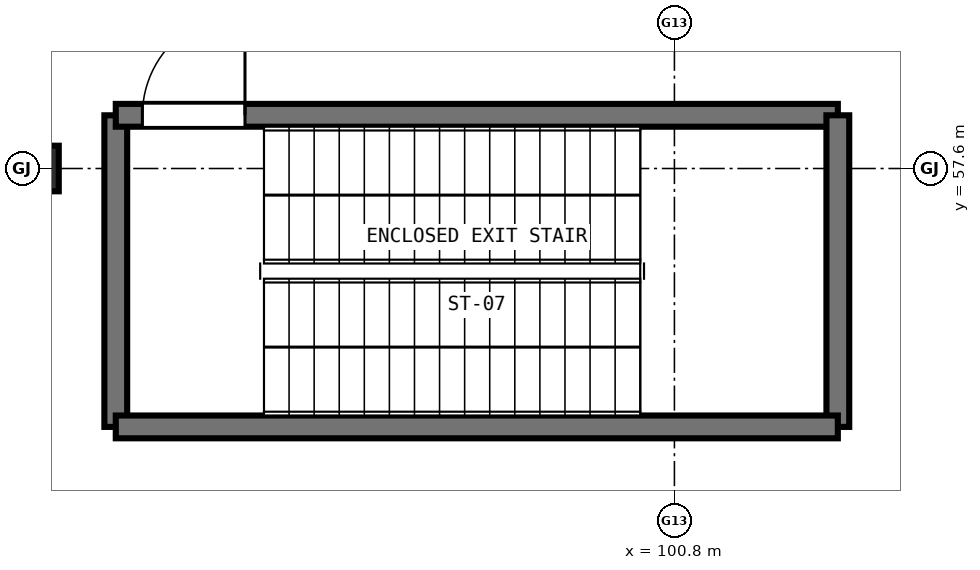
"""IFC4 building model, lengths in metres.
Left out: names, types, materials, properties, quantities, classifications, styles, units other than length and angle.
Written with IfcOpenShell. Run it as: python <this file> out.ifc"""

import sys

from ifc_helpers import new_model, si_unit, direction, frame, frame_2d, origin, origin_2d, place, context, subcontext, project, spatial, rectangle, extrude, element, fill, save


model = new_model("IFC4")
c1 = context("Model", 3, precision=1e-05, world=origin(), true_north=direction((0.0, 1.0)))
c2 = subcontext(c1, "Body", "Model", "MODEL_VIEW")
j1 = project(units=[si_unit("LENGTHUNIT", "METRE"), si_unit("PLANEANGLEUNIT", "RADIAN")], contexts=[c1])
p1 = place(None, origin())
s1 = spatial("IfcSite", under=j1, at=p1, CompositionType="ELEMENT")
p2 = place(p1, origin())
s2 = spatial("IfcBuilding", under=s1, at=p2, CompositionType="ELEMENT")
p3 = place(p2, frame((0.0, 0.0, -4.8)))
s3 = spatial("IfcBuildingStorey", under=s2, at=p3, CompositionType="ELEMENT", Elevation=-4.8)
p4 = place(p3, frame((92.4, 57.6, 0.0), z_axis=(0.0, 0.0, 1.0), x_axis=(1.0, 0.0, 0.0)))
e1 = element("IfcColumn", 1, at=p4, inside=s3, PredefinedType="COLUMN", context=c2, shape_type="SweptSolid", body=[
    extrude(rectangle(XDim=0.6, YDim=0.6, at=origin_2d()), origin(), (0.0, 0.0, 1.0), 4.8),
])
p5 = place(p3, frame((93.45, 54.2, 0.0), z_axis=(0.0, 0.0, 1.0), x_axis=(0.0, 1.0, 0.0)))
e2 = element("IfcWall", 2, at=p5, inside=s3, PredefinedType="SHEAR", context=c2, shape_type="SweptSolid", body=[
    extrude(rectangle(XDim=4.1, YDim=0.3, at=frame_2d((2.05, 0.0))), origin(), (0.0, 0.0, 1.0), 4.5),
])
p6 = place(p3, frame((93.45, 58.3, 0.0), z_axis=(0.0, 0.0, 1.0), x_axis=(1.0, 0.0, 0.0)))
e3 = element("IfcWall", 3, at=p6, inside=s3, PredefinedType="SHEAR", context=c2, shape_type="SweptSolid", body=[
    extrude(rectangle(XDim=9.5, YDim=0.3, at=frame_2d((4.75, 0.0))), origin(), (0.0, 0.0, 1.0), 4.5),
])
p7 = place(p6, frame((0.35, 0.0, 0.0)))
e4 = element("IfcOpeningElement", 4, at=p7, cuts=e3, PredefinedType="OPENING", context=c2, shape_type="SweptSolid", body=[
    extrude(rectangle(XDim=1.35, YDim=2.2, at=frame_2d((0.675, 1.1))), frame((0.0, 0.16, 0.0), z_axis=(0.0, -1.0, 0.0), x_axis=(1.0, 0.0, 0.0)), (0.0, 0.0, 1.0), 0.32),
])
p8 = place(p3, frame((102.95, 58.3, 0.0), z_axis=(0.0, 0.0, 1.0), x_axis=(0.0, -1.0, 0.0)))
e5 = element("IfcWall", 5, at=p8, inside=s3, PredefinedType="SHEAR", context=c2, shape_type="SweptSolid", body=[
    extrude(rectangle(XDim=4.1, YDim=0.3, at=frame_2d((2.05, 0.0))), origin(), (0.0, 0.0, 1.0), 4.5),
])
p9 = place(p3, frame((102.95, 54.2, 0.0), z_axis=(0.0, 0.0, 1.0), x_axis=(-1.0, 0.0, 0.0)))
e6 = element("IfcWall", 6, at=p9, inside=s3, PredefinedType="SHEAR", context=c2, shape_type="SweptSolid", body=[
    extrude(rectangle(XDim=9.5, YDim=0.3, at=frame_2d((4.75, 0.0))), origin(), (0.0, 0.0, 1.0), 4.5),
])
p10 = place(p7, origin())
e7 = element("IfcDoor", 7, at=p10, inside=s3, OperationType="SINGLE_SWING_RIGHT", PredefinedType="DOOR", context=c2, shape_type="SweptSolid", body=[
    extrude(rectangle(XDim=1.35, YDim=2.2, at=frame_2d((0.675, 1.1))), frame((0.0, 0.025, 0.0), z_axis=(0.0, -1.0, 0.0), x_axis=(1.0, 0.0, 0.0)), (0.0, 0.0, 1.0), 0.05),
])
fill(e4, e7)
save(model, sys.argv[1])
